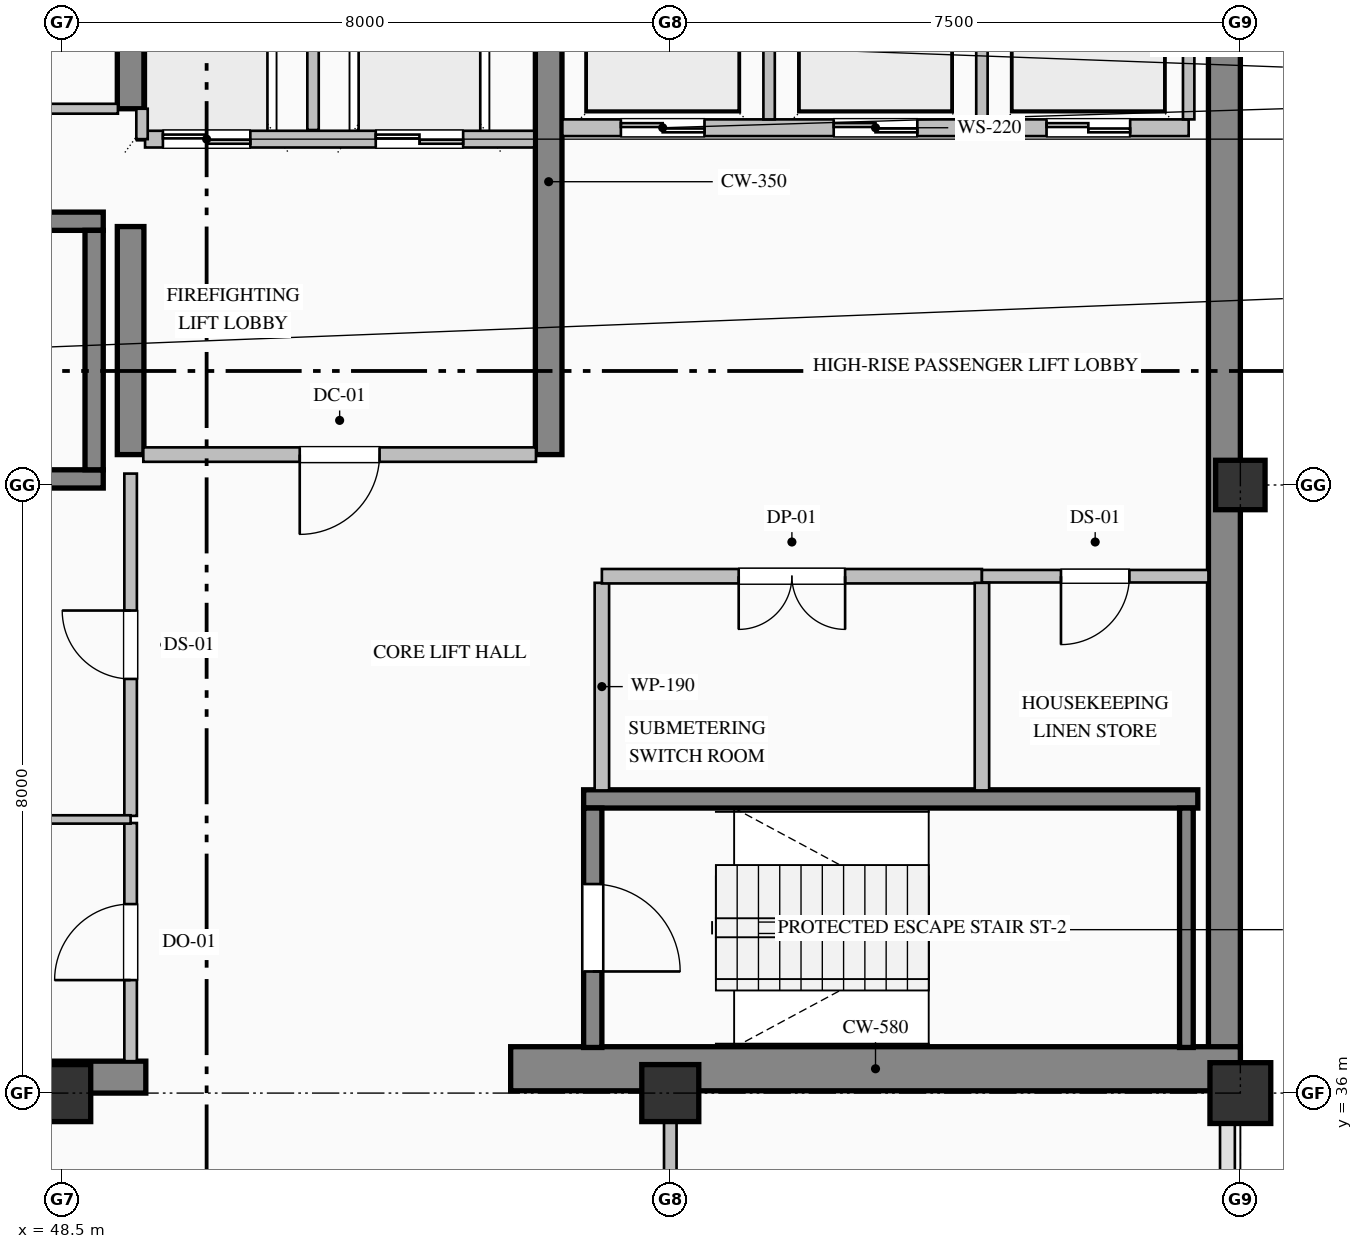
"""IFC4 building model, lengths in metres.
Left out: names, types, materials, properties, quantities, classifications, styles, units other than length and angle.
Written with IfcOpenShell. Run it as: python <this file> out.ifc"""

import sys

from ifc_helpers import new_model, si_unit, direction, frame, frame_2d, origin, origin_2d, place, context, subcontext, project, spatial, rectangle, hollow_rectangle, extrude, element, fill, save


model = new_model("IFC4")
c1 = context("Model", 3, precision=1e-05, world=origin(), true_north=direction((0.0, 1.0)))
c2 = subcontext(c1, "Body", "Model", "MODEL_VIEW")
j1 = project(units=[si_unit("LENGTHUNIT", "METRE"), si_unit("PLANEANGLEUNIT", "RADIAN")], contexts=[c1])
p1 = place(None, origin())
s1 = spatial("IfcSite", under=j1, at=p1, CompositionType="ELEMENT")
p2 = place(p1, origin())
s2 = spatial("IfcBuilding", under=s1, at=p2, CompositionType="ELEMENT")
p3 = place(p2, frame((0.0, 0.0, 295.2)))
s3 = spatial("IfcBuildingStorey", under=s2, at=p3, CompositionType="ELEMENT", Elevation=295.2)
p4 = place(p3, frame((63.79, 36.32, 0.0), z_axis=(0.0, 0.0, 1.0), x_axis=(0.0, 1.0, 0.0)))
e1 = element("IfcWall", 1, at=p4, inside=s3, PredefinedType="SHEAR", context=c2, shape_type="SweptSolid", body=[
    extrude(rectangle(XDim=15.26, YDim=0.42, at=frame_2d((7.63, 0.0))), origin(), (0.0, 0.0, 1.0), 3.785),
])
p5 = place(p3, frame((40.5, 36.21, 0.0), z_axis=(0.0, 0.0, 1.0), x_axis=(1.0, 0.0, 0.0)))
e2 = element("IfcWall", 2, at=p5, inside=s3, PredefinedType="SHEAR", context=c2, shape_type="SweptSolid", body=[
    extrude(rectangle(XDim=9.1, YDim=0.42, at=frame_2d((4.55, 0.0))), origin(), (0.0, 0.0, 1.0), 3.785),
])
p6 = place(p3, frame((54.4, 36.32, 0.0), z_axis=(0.0, 0.0, 1.0), x_axis=(1.0, 0.0, 0.0)))
e3 = element("IfcWall", 3, at=p6, inside=s3, PredefinedType="SHEAR", context=c2, shape_type="SweptSolid", body=[
    extrude(rectangle(XDim=9.6, YDim=0.58, at=frame_2d((4.8, 0.0))), origin(), (0.0, 0.0, 1.0), 4.0),
])
p7 = place(p3, frame((49.4, 44.4, 0.0), z_axis=(0.0, 0.0, 1.0), x_axis=(0.0, 1.0, 0.0)))
e4 = element("IfcWall", 4, at=p7, inside=s3, PredefinedType="SHEAR", context=c2, shape_type="SweptSolid", body=[
    extrude(rectangle(XDim=3.0, YDim=0.35, at=frame_2d((1.5, 0.0))), origin(), (0.0, 0.0, 1.0), 3.785),
])
p8 = place(p3, frame((49.4, 48.95, 0.0), z_axis=(0.0, 0.0, 1.0), x_axis=(0.0, 1.0, 0.0)))
e5 = element("IfcWall", 5, at=p8, inside=s3, PredefinedType="SHEAR", context=c2, shape_type="SweptSolid", body=[
    extrude(rectangle(XDim=2.63, YDim=0.35, at=frame_2d((1.315, 0.0))), origin(), (0.0, 0.0, 1.0), 3.785),
])
p9 = place(p3, frame((54.9, 44.4, 0.0), z_axis=(0.0, 0.0, 1.0), x_axis=(0.0, 1.0, 0.0)))
e6 = element("IfcWall", 6, at=p9, inside=s3, PredefinedType="SHEAR", context=c2, shape_type="SweptSolid", body=[
    extrude(rectangle(XDim=7.18, YDim=0.35, at=frame_2d((3.59, 0.0))), origin(), (0.0, 0.0, 1.0), 3.785),
])
for number, where, z_axis, x_axis in (
    (7, (48.5, 36.0, 0.0), (0.0, 0.0, 1.0), (1.0, 0.0, 0.0)),
    (8, (56.5, 36.0, 0.0), (0.0, 0.0, 1.0), (1.0, 0.0, 0.0)),
):
    element("IfcColumn", number, at=place(p3, frame(where, z_axis=z_axis, x_axis=x_axis)), inside=s3, PredefinedType="COLUMN", context=c2, shape_type="SweptSolid", body=[
        extrude(rectangle(XDim=0.75, YDim=0.75, at=origin_2d()), origin(), (0.0, 0.0, 1.0), 4.0),
    ])
p10 = place(p3, frame((64.0, 36.0, 0.0), z_axis=(0.0, 0.0, 1.0), x_axis=(1.0, 0.0, 0.0)))
e9 = element("IfcColumn", 9, at=p10, inside=s3, PredefinedType="COLUMN", context=c2, shape_type="SweptSolid", body=[
    extrude(hollow_rectangle(XDim=0.8, YDim=0.8, WallThickness=0.032, at=origin_2d()), origin(), (0.0, 0.0, 1.0), 4.0),
])
p11 = place(p3, frame((64.0, 44.0, 0.0), z_axis=(0.0, 0.0, 1.0), x_axis=(1.0, 0.0, 0.0)))
e10 = element("IfcColumn", 10, at=p11, inside=s3, PredefinedType="COLUMN", context=c2, shape_type="SweptSolid", body=[
    extrude(hollow_rectangle(XDim=0.65, YDim=0.65, WallThickness=0.028, at=origin_2d()), origin(), (0.0, 0.0, 1.0), 4.0),
])
for number, where, z_axis, x_axis in (
    (11, (40.96, 47.47, 0.0), (0.0, 0.0, 1.0), (1.0, 0.0, 0.0)),
    (12, (49.04, 44.08, 0.0), (0.0, 0.0, 1.0), (-1.0, 0.0, 0.0)),
):
    element("IfcWall", number, at=place(p3, frame(where, z_axis=z_axis, x_axis=x_axis)), inside=s3, PredefinedType="SOLIDWALL", context=c2, shape_type="SweptSolid", body=[
        extrude(rectangle(XDim=8.08, YDim=0.24, at=frame_2d((4.04, 0.0))), origin(), (0.0, 0.0, 1.0), 4.0),
    ])
p12 = place(p3, frame((48.92, 44.2, 0.0), z_axis=(0.0, 0.0, 1.0), x_axis=(0.0, 1.0, 0.0)))
e13 = element("IfcWall", 13, at=p12, inside=s3, PredefinedType="SOLIDWALL", context=c2, shape_type="SweptSolid", body=[
    extrude(rectangle(XDim=3.15, YDim=0.24, at=frame_2d((1.575, 0.0))), origin(), (0.0, 0.0, 1.0), 4.0),
])
p13 = place(p3, frame((55.36, 39.87, 0.0), z_axis=(0.0, 0.0, 1.0), x_axis=(1.0, 0.0, 0.0)))
e14 = element("IfcWall", 14, at=p13, inside=s3, PredefinedType="SOLIDWALL", context=c2, shape_type="SweptSolid", body=[
    extrude(rectangle(XDim=8.08, YDim=0.24, at=frame_2d((4.04, 0.0))), origin(), (0.0, 0.0, 1.0), 4.0),
])
p14 = place(p3, frame((55.48, 39.75, 0.0), z_axis=(0.0, 0.0, 1.0), x_axis=(0.0, -1.0, 0.0)))
e15 = element("IfcWall", 15, at=p14, inside=s3, PredefinedType="SOLIDWALL", context=c2, shape_type="SweptSolid", body=[
    extrude(rectangle(XDim=3.15, YDim=0.24, at=frame_2d((1.575, 0.0))), origin(), (0.0, 0.0, 1.0), 4.0),
])
p15 = place(p14, frame((1.0, 0.0, 0.0)))
e16 = element("IfcOpeningElement", 16, at=p15, cuts=e15, PredefinedType="OPENING", context=c2, shape_type="SweptSolid", body=[
    extrude(rectangle(XDim=1.15, YDim=2.2, at=frame_2d((0.575, 1.1))), frame((0.0, 0.13, 0.0), z_axis=(0.0, -1.0, 0.0), x_axis=(1.0, 0.0, 0.0)), (0.0, 0.0, 1.0), 0.26),
])
p16 = place(p3, frame((63.29, 36.6, 0.0), z_axis=(0.0, 0.0, 1.0), x_axis=(0.0, 1.0, 0.0)))
e17 = element("IfcWall", 17, at=p16, inside=s3, PredefinedType="SOLIDWALL", context=c2, shape_type="SweptSolid", body=[
    extrude(rectangle(XDim=3.15, YDim=0.18, at=frame_2d((1.575, 0.0))), origin(), (0.0, 0.0, 1.0), 4.0),
])
p17 = place(p3, frame((54.71, 48.55, 0.0), z_axis=(0.0, 0.0, 1.0), x_axis=(-1.0, 0.0, 0.0)))
e18 = element("IfcWall", 18, at=p17, inside=s3, PredefinedType="PARTITIONING", context=c2, shape_type="SweptSolid", body=[
    extrude(rectangle(XDim=5.12, YDim=0.22, at=frame_2d((2.56, 0.0))), origin(), (0.0, 0.0, 1.0), 3.785),
])
p18 = place(p17, frame((3.735, 0.0, 0.0)))
e19 = element("IfcOpeningElement", 19, at=p18, cuts=e18, PredefinedType="OPENING", context=c2, shape_type="SweptSolid", body=[
    extrude(rectangle(XDim=1.15, YDim=2.2, at=frame_2d((0.575, 1.1))), frame((0.0, 0.12, 0.0), z_axis=(0.0, -1.0, 0.0), x_axis=(1.0, 0.0, 0.0)), (0.0, 0.0, 1.0), 0.24),
])
p19 = place(p17, frame((0.935, 0.0, 0.0)))
e20 = element("IfcOpeningElement", 20, at=p19, cuts=e18, PredefinedType="OPENING", context=c2, shape_type="SweptSolid", body=[
    extrude(rectangle(XDim=1.15, YDim=2.2, at=frame_2d((0.575, 1.1))), frame((0.0, 0.12, 0.0), z_axis=(0.0, -1.0, 0.0), x_axis=(1.0, 0.0, 0.0)), (0.0, 0.0, 1.0), 0.24),
])
p20 = place(p3, frame((51.8, 48.67, 0.0), z_axis=(0.0, 0.0, 1.0), x_axis=(0.0, 1.0, 0.0)))
e21 = element("IfcWall", 21, at=p20, inside=s3, PredefinedType="PARTITIONING", context=c2, shape_type="SweptSolid", body=[
    extrude(rectangle(XDim=2.91, YDim=0.15, at=frame_2d((1.455, 0.0))), origin(), (0.0, 0.0, 1.0), 3.785),
])
p21 = place(p3, frame((49.55, 48.55, 0.0), z_axis=(0.0, 0.0, 1.0), x_axis=(0.0, 1.0, 0.0)))
e22 = element("IfcWall", 22, at=p21, inside=s3, PredefinedType="PARTITIONING", context=c2, shape_type="SweptSolid", body=[
    extrude(rectangle(XDim=0.4, YDim=0.15, at=frame_2d((0.2, 0.0))), origin(), (0.0, 0.0, 1.0), 3.785),
])
p22 = place(p3, frame((63.32, 48.7, 0.0), z_axis=(0.0, 0.0, 1.0), x_axis=(-1.0, 0.0, 0.0)))
e23 = element("IfcWall", 23, at=p22, inside=s3, PredefinedType="PARTITIONING", context=c2, shape_type="SweptSolid", body=[
    extrude(rectangle(XDim=8.24, YDim=0.22, at=frame_2d((4.12, 0.0))), origin(), (0.0, 0.0, 1.0), 3.785),
])
p23 = place(p22, frame((6.37, 0.0, 0.0)))
e24 = element("IfcOpeningElement", 24, at=p23, cuts=e23, PredefinedType="OPENING", context=c2, shape_type="SweptSolid", body=[
    extrude(rectangle(XDim=1.1, YDim=2.2, at=frame_2d((0.55, 1.1))), frame((0.0, 0.12, 0.0), z_axis=(0.0, -1.0, 0.0), x_axis=(1.0, 0.0, 0.0)), (0.0, 0.0, 1.0), 0.24),
])
p24 = place(p22, frame((3.57, 0.0, 0.0)))
e25 = element("IfcOpeningElement", 25, at=p24, cuts=e23, PredefinedType="OPENING", context=c2, shape_type="SweptSolid", body=[
    extrude(rectangle(XDim=1.1, YDim=2.2, at=frame_2d((0.55, 1.1))), frame((0.0, 0.12, 0.0), z_axis=(0.0, -1.0, 0.0), x_axis=(1.0, 0.0, 0.0)), (0.0, 0.0, 1.0), 0.24),
])
p25 = place(p22, frame((0.77, 0.0, 0.0)))
e26 = element("IfcOpeningElement", 26, at=p25, cuts=e23, PredefinedType="OPENING", context=c2, shape_type="SweptSolid", body=[
    extrude(rectangle(XDim=1.1, YDim=2.2, at=frame_2d((0.55, 1.1))), frame((0.0, 0.12, 0.0), z_axis=(0.0, -1.0, 0.0), x_axis=(1.0, 0.0, 0.0)), (0.0, 0.0, 1.0), 0.24),
])
for number, where, z_axis, x_axis in (
    (27, (57.8, 48.81, 0.0), (0.0, 0.0, 1.0), (0.0, 1.0, 0.0)),
    (28, (60.6, 48.81, 0.0), (0.0, 0.0, 1.0), (0.0, 1.0, 0.0)),
    (29, (63.32, 48.81, 0.0), (0.0, 0.0, 1.0), (0.0, 1.0, 0.0)),
):
    element("IfcWall", number, at=place(p3, frame(where, z_axis=z_axis, x_axis=x_axis)), inside=s3, PredefinedType="PARTITIONING", context=c2, shape_type="SweptSolid", body=[
        extrude(rectangle(XDim=2.77, YDim=0.15, at=frame_2d((1.385, 0.0))), origin(), (0.0, 0.0, 1.0), 3.785),
    ])
p26 = place(p3, frame((43.5, 48.95, 0.0), z_axis=(0.0, 0.0, 1.0), x_axis=(1.0, 0.0, 0.0)))
e30 = element("IfcWall", 30, at=p26, inside=s3, PredefinedType="PARTITIONING", context=c2, shape_type="SweptSolid", body=[
    extrude(rectangle(XDim=5.733, YDim=0.13, at=frame_2d((2.866, 0.0))), origin(), (0.0, 0.0, 1.0), 3.785),
])
p27 = place(p26, frame((2.406, 0.0, 0.0)))
e31 = element("IfcOpeningElement", 31, at=p27, cuts=e30, PredefinedType="OPENING", context=c2, shape_type="SweptSolid", body=[
    extrude(rectangle(XDim=0.92, YDim=2.15, at=frame_2d((0.46, 1.075))), frame((0.0, 0.075, 0.0), z_axis=(0.0, -1.0, 0.0), x_axis=(1.0, 0.0, 0.0)), (0.0, 0.0, 1.0), 0.15),
])
p28 = place(p3, frame((54.733, 44.4, 0.0), z_axis=(0.0, 0.0, 1.0), x_axis=(-1.0, 0.0, 0.0)))
e32 = element("IfcWall", 32, at=p28, inside=s3, PredefinedType="PARTITIONING", context=c2, shape_type="SweptSolid", body=[
    extrude(rectangle(XDim=5.166, YDim=0.19, at=frame_2d((2.583, 0.0))), origin(), (0.0, 0.0, 1.0), 3.785),
])
p29 = place(p28, frame((2.058, 0.0, 0.0)))
e33 = element("IfcOpeningElement", 33, at=p29, cuts=e32, PredefinedType="OPENING", context=c2, shape_type="SweptSolid", body=[
    extrude(rectangle(XDim=1.05, YDim=2.15, at=frame_2d((0.525, 1.075))), frame((0.0, 0.105, 0.0), z_axis=(0.0, -1.0, 0.0), x_axis=(1.0, 0.0, 0.0)), (0.0, 0.0, 1.0), 0.21),
])
p30 = place(p3, frame((49.4, 36.42, 0.0), z_axis=(0.0, 0.0, 1.0), x_axis=(0.0, 1.0, 0.0)))
e34 = element("IfcWall", 34, at=p30, inside=s3, PredefinedType="PARTITIONING", context=c2, shape_type="SweptSolid", body=[
    extrude(rectangle(XDim=3.133, YDim=0.165, at=frame_2d((1.566, 0.0))), origin(), (0.0, 0.0, 1.0), 3.027),
])
p31 = place(p30, frame((1.066, 0.0, 0.0)))
e35 = element("IfcOpeningElement", 35, at=p31, cuts=e34, PredefinedType="OPENING", context=c2, shape_type="SweptSolid", body=[
    extrude(rectangle(XDim=1.0, YDim=2.15, at=frame_2d((0.5, 1.075))), frame((0.0, 0.093, 0.0), z_axis=(0.0, -1.0, 0.0), x_axis=(1.0, 0.0, 0.0)), (0.0, 0.0, 1.0), 0.185),
])
p32 = place(p3, frame((49.4, 39.647, 0.0), z_axis=(0.0, 0.0, 1.0), x_axis=(0.0, 1.0, 0.0)))
e36 = element("IfcWall", 36, at=p32, inside=s3, PredefinedType="PARTITIONING", context=c2, shape_type="SweptSolid", body=[
    extrude(rectangle(XDim=4.503, YDim=0.165, at=frame_2d((2.251, 0.0))), origin(), (0.0, 0.0, 1.0), 3.027),
])
p33 = place(p32, frame((1.802, 0.0, 0.0)))
e37 = element("IfcOpeningElement", 37, at=p33, cuts=e36, PredefinedType="OPENING", context=c2, shape_type="SweptSolid", body=[
    extrude(rectangle(XDim=0.9, YDim=2.15, at=frame_2d((0.45, 1.075))), frame((0.0, 0.093, 0.0), z_axis=(0.0, -1.0, 0.0), x_axis=(1.0, 0.0, 0.0)), (0.0, 0.0, 1.0), 0.185),
])
p34 = place(p3, frame((55.6, 42.713, 0.0), z_axis=(0.0, 0.0, 1.0), x_axis=(0.0, -1.0, 0.0)))
e38 = element("IfcWall", 38, at=p34, inside=s3, PredefinedType="PARTITIONING", context=c2, shape_type="SweptSolid", body=[
    extrude(rectangle(XDim=2.731, YDim=0.19, at=frame_2d((1.365, 0.0))), origin(), (0.0, 0.0, 1.0), 3.785),
])
p35 = place(p3, frame((40.92, 39.6, 0.0), z_axis=(0.0, 0.0, 1.0), x_axis=(1.0, 0.0, 0.0)))
e39 = element("IfcWall", 39, at=p35, inside=s3, PredefinedType="MOVABLE", context=c2, shape_type="SweptSolid", body=[
    extrude(rectangle(XDim=8.48, YDim=0.11, at=frame_2d((4.24, 0.0))), origin(), (0.0, 0.0, 1.0), 3.785),
])
p36 = place(p3, frame((60.6, 42.8, 0.0), z_axis=(0.0, 0.0, 1.0), x_axis=(-1.0, 0.0, 0.0)))
e40 = element("IfcWall", 40, at=p36, inside=s3, PredefinedType="PARTITIONING", context=c2, shape_type="SweptSolid", body=[
    extrude(rectangle(XDim=5.0, YDim=0.19, at=frame_2d((2.5, 0.0))), origin(), (0.0, 0.0, 1.0), 3.785),
])
p37 = place(p36, frame((1.8, 0.0, 0.0)))
e41 = element("IfcOpeningElement", 41, at=p37, cuts=e40, PredefinedType="OPENING", context=c2, shape_type="SweptSolid", body=[
    extrude(rectangle(XDim=1.4, YDim=2.25, at=frame_2d((0.7, 1.125))), frame((0.0, 0.105, 0.0), z_axis=(0.0, -1.0, 0.0), x_axis=(1.0, 0.0, 0.0)), (0.0, 0.0, 1.0), 0.21),
])
p38 = place(p3, frame((63.58, 42.8, 0.0), z_axis=(0.0, 0.0, 1.0), x_axis=(-1.0, 0.0, 0.0)))
e42 = element("IfcWall", 42, at=p38, inside=s3, PredefinedType="PARTITIONING", context=c2, shape_type="SweptSolid", body=[
    extrude(rectangle(XDim=2.98, YDim=0.165, at=frame_2d((1.49, 0.0))), origin(), (0.0, 0.0, 1.0), 3.785),
])
p39 = place(p38, frame((1.04, 0.0, 0.0)))
e43 = element("IfcOpeningElement", 43, at=p39, cuts=e42, PredefinedType="OPENING", context=c2, shape_type="SweptSolid", body=[
    extrude(rectangle(XDim=0.9, YDim=2.15, at=frame_2d((0.45, 1.075))), frame((0.0, 0.093, 0.0), z_axis=(0.0, -1.0, 0.0), x_axis=(1.0, 0.0, 0.0)), (0.0, 0.0, 1.0), 0.185),
])
p40 = place(p3, frame((60.6, 42.713, 0.0), z_axis=(0.0, 0.0, 1.0), x_axis=(0.0, -1.0, 0.0)))
e44 = element("IfcWall", 44, at=p40, inside=s3, PredefinedType="PARTITIONING", context=c2, shape_type="SweptSolid", body=[
    extrude(rectangle(XDim=2.731, YDim=0.19, at=frame_2d((1.365, 0.0))), origin(), (0.0, 0.0, 1.0), 3.785),
])
p41 = place(p3, frame((56.5, 36.0, 0.0), z_axis=(0.0, 0.0, 1.0), x_axis=(0.0, -1.0, 0.0)))
e45 = element("IfcWall", 45, at=p41, inside=s3, PredefinedType="PARTITIONING", context=c2, shape_type="SweptSolid", body=[
    extrude(rectangle(XDim=2.325, YDim=0.165, at=frame_2d((1.163, 0.0))), origin(), (0.0, 0.0, 1.0), 3.177),
])
p42 = place(p15, origin())
e46 = element("IfcDoor", 46, at=p42, inside=s3, OperationType="SINGLE_SWING_RIGHT", PredefinedType="DOOR", context=c2, shape_type="SweptSolid", body=[
    extrude(rectangle(XDim=1.15, YDim=2.2, at=frame_2d((0.575, 1.1))), frame((0.0, 0.025, 0.0), z_axis=(0.0, -1.0, 0.0), x_axis=(1.0, 0.0, 0.0)), (0.0, 0.0, 1.0), 0.05),
])
fill(e16, e46)
p43 = place(p18, origin())
e47 = element("IfcDoor", 47, at=p43, inside=s3, OperationType="DOUBLE_DOOR_SLIDING", PredefinedType="DOOR", context=c2, shape_type="SweptSolid", body=[
    extrude(rectangle(XDim=1.15, YDim=2.2, at=frame_2d((0.575, 1.1))), frame((0.0, 0.025, 0.0), z_axis=(0.0, -1.0, 0.0), x_axis=(1.0, 0.0, 0.0)), (0.0, 0.0, 1.0), 0.05),
])
fill(e19, e47)
p44 = place(p19, origin())
e48 = element("IfcDoor", 48, at=p44, inside=s3, OperationType="DOUBLE_DOOR_SLIDING", PredefinedType="DOOR", context=c2, shape_type="SweptSolid", body=[
    extrude(rectangle(XDim=1.15, YDim=2.2, at=frame_2d((0.575, 1.1))), frame((0.0, 0.025, 0.0), z_axis=(0.0, -1.0, 0.0), x_axis=(1.0, 0.0, 0.0)), (0.0, 0.0, 1.0), 0.05),
])
fill(e20, e48)
p45 = place(p23, origin())
e49 = element("IfcDoor", 49, at=p45, inside=s3, OperationType="DOUBLE_DOOR_SLIDING", PredefinedType="DOOR", context=c2, shape_type="SweptSolid", body=[
    extrude(rectangle(XDim=1.1, YDim=2.2, at=frame_2d((0.55, 1.1))), frame((0.0, 0.025, 0.0), z_axis=(0.0, -1.0, 0.0), x_axis=(1.0, 0.0, 0.0)), (0.0, 0.0, 1.0), 0.05),
])
fill(e24, e49)
p46 = place(p24, origin())
e50 = element("IfcDoor", 50, at=p46, inside=s3, OperationType="DOUBLE_DOOR_SLIDING", PredefinedType="DOOR", context=c2, shape_type="SweptSolid", body=[
    extrude(rectangle(XDim=1.1, YDim=2.2, at=frame_2d((0.55, 1.1))), frame((0.0, 0.025, 0.0), z_axis=(0.0, -1.0, 0.0), x_axis=(1.0, 0.0, 0.0)), (0.0, 0.0, 1.0), 0.05),
])
fill(e25, e50)
p47 = place(p25, origin())
e51 = element("IfcDoor", 51, at=p47, inside=s3, OperationType="DOUBLE_DOOR_SLIDING", PredefinedType="DOOR", context=c2, shape_type="SweptSolid", body=[
    extrude(rectangle(XDim=1.1, YDim=2.2, at=frame_2d((0.55, 1.1))), frame((0.0, 0.025, 0.0), z_axis=(0.0, -1.0, 0.0), x_axis=(1.0, 0.0, 0.0)), (0.0, 0.0, 1.0), 0.05),
])
fill(e26, e51)
p48 = place(p29, origin())
e52 = element("IfcDoor", 52, at=p48, inside=s3, OperationType="SINGLE_SWING_RIGHT", PredefinedType="DOOR", context=c2, shape_type="SweptSolid", body=[
    extrude(rectangle(XDim=1.05, YDim=2.15, at=frame_2d((0.525, 1.075))), frame((0.0, 0.025, 0.0), z_axis=(0.0, -1.0, 0.0), x_axis=(1.0, 0.0, 0.0)), (0.0, 0.0, 1.0), 0.05),
])
fill(e33, e52)
p49 = place(p31, origin())
e53 = element("IfcDoor", 53, at=p49, inside=s3, OperationType="SINGLE_SWING_LEFT", PredefinedType="DOOR", context=c2, shape_type="SweptSolid", body=[
    extrude(rectangle(XDim=1.0, YDim=2.15, at=frame_2d((0.5, 1.075))), frame((0.0, 0.025, 0.0), z_axis=(0.0, -1.0, 0.0), x_axis=(1.0, 0.0, 0.0)), (0.0, 0.0, 1.0), 0.05),
])
fill(e35, e53)
p50 = place(p33, origin())
e54 = element("IfcDoor", 54, at=p50, inside=s3, OperationType="SINGLE_SWING_RIGHT", PredefinedType="DOOR", context=c2, shape_type="SweptSolid", body=[
    extrude(rectangle(XDim=0.9, YDim=2.15, at=frame_2d((0.45, 1.075))), frame((0.0, 0.025, 0.0), z_axis=(0.0, -1.0, 0.0), x_axis=(1.0, 0.0, 0.0)), (0.0, 0.0, 1.0), 0.05),
])
fill(e37, e54)
p51 = place(p37, origin())
e55 = element("IfcDoor", 55, at=p51, inside=s3, OperationType="DOUBLE_DOOR_SINGLE_SWING", PredefinedType="DOOR", context=c2, shape_type="SweptSolid", body=[
    extrude(rectangle(XDim=1.4, YDim=2.25, at=frame_2d((0.7, 1.125))), frame((0.0, 0.025, 0.0), z_axis=(0.0, -1.0, 0.0), x_axis=(1.0, 0.0, 0.0)), (0.0, 0.0, 1.0), 0.05),
])
fill(e41, e55)
p52 = place(p39, origin())
e56 = element("IfcDoor", 56, at=p52, inside=s3, OperationType="SINGLE_SWING_RIGHT", PredefinedType="DOOR", context=c2, shape_type="SweptSolid", body=[
    extrude(rectangle(XDim=0.9, YDim=2.15, at=frame_2d((0.45, 1.075))), frame((0.0, 0.025, 0.0), z_axis=(0.0, -1.0, 0.0), x_axis=(1.0, 0.0, 0.0)), (0.0, 0.0, 1.0), 0.05),
])
fill(e43, e56)
save(model, sys.argv[1])
